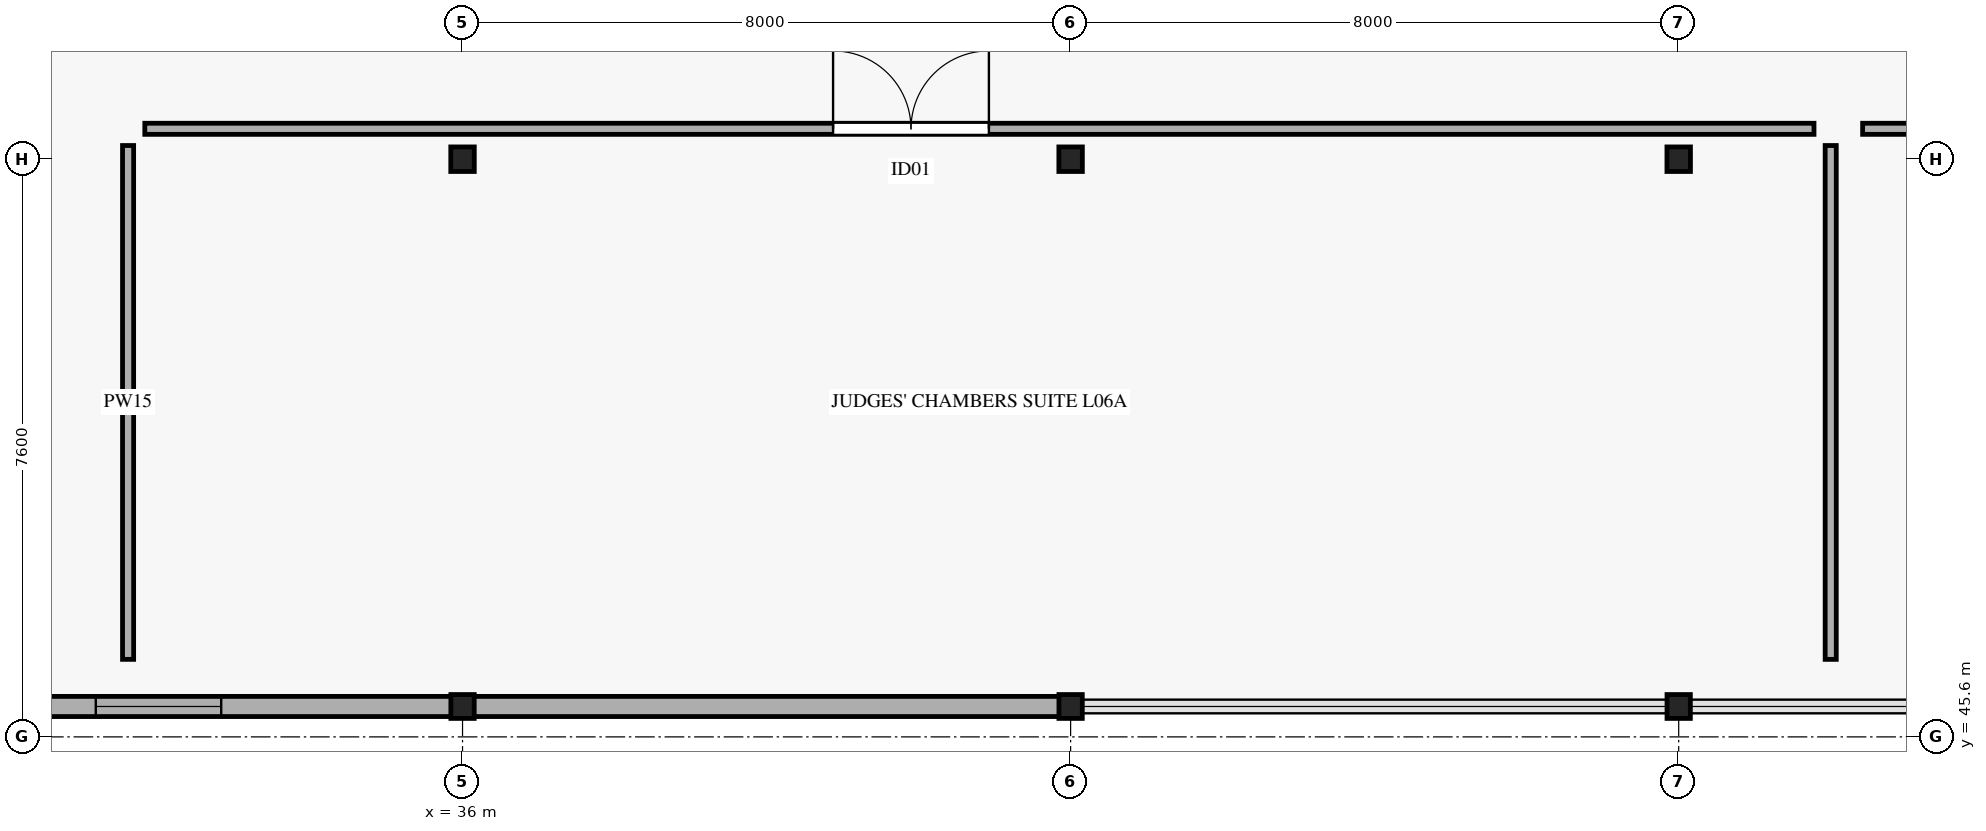
"""IFC4 building model, lengths in metres.
Left out: names, types, materials, properties, quantities, classifications, styles, units other than length and angle.
Written with IfcOpenShell. Run it as: python <this file> out.ifc"""

import sys

from ifc_helpers import new_model, si_unit, direction, frame, frame_2d, origin, origin_2d, place, context, subcontext, project, spatial, rectangle, i_section, extrude, element, fill, save


model = new_model("IFC4")
c1 = context("Model", 3, precision=1e-05, world=origin(), true_north=direction((0.0, 1.0)))
c2 = subcontext(c1, "Body", "Model", "MODEL_VIEW")
j1 = project(units=[si_unit("LENGTHUNIT", "METRE"), si_unit("PLANEANGLEUNIT", "RADIAN")], contexts=[c1])
p1 = place(None, origin())
s1 = spatial("IfcSite", under=j1, at=p1, CompositionType="ELEMENT")
p2 = place(p1, origin())
s2 = spatial("IfcBuilding", under=s1, at=p2, CompositionType="ELEMENT")
p3 = place(p2, frame((0.0, 0.0, 29.4)))
s3 = spatial("IfcBuildingStorey", under=s2, at=p3, CompositionType="ELEMENT", Elevation=29.4)
p4 = place(p3, frame((36.0, 46.0, 0.0), z_axis=(0.0, 0.0, 1.0), x_axis=(1.0, 0.0, 0.0)))
e1 = element("IfcColumn", 1, at=p4, inside=s3, PredefinedType="COLUMN", context=c2, shape_type="SweptSolid", body=[
    extrude(i_section(OverallWidth=0.307, OverallDepth=0.314, WebThickness=0.012, FlangeThickness=0.019, FilletRadius=0.015, at=origin_2d()), origin(), (0.0, 0.0, 1.0), 4.0),
])
p5 = place(p3, frame((36.0, 53.2, 0.0), z_axis=(0.0, 0.0, 1.0), x_axis=(1.0, 0.0, 0.0)))
e2 = element("IfcColumn", 2, at=p5, inside=s3, PredefinedType="COLUMN", context=c2, shape_type="SweptSolid", body=[
    extrude(i_section(OverallWidth=0.309, OverallDepth=0.323, WebThickness=0.014, FlangeThickness=0.023, FilletRadius=0.015, at=origin_2d()), origin(), (0.0, 0.0, 1.0), 4.0),
])
p6 = place(p3, frame((44.0, 46.0, 0.0), z_axis=(0.0, 0.0, 1.0), x_axis=(1.0, 0.0, 0.0)))
e3 = element("IfcColumn", 3, at=p6, inside=s3, PredefinedType="COLUMN", context=c2, shape_type="SweptSolid", body=[
    extrude(i_section(OverallWidth=0.307, OverallDepth=0.314, WebThickness=0.012, FlangeThickness=0.019, FilletRadius=0.015, at=origin_2d()), origin(), (0.0, 0.0, 1.0), 4.0),
])
p7 = place(p3, frame((44.0, 53.2, 0.0), z_axis=(0.0, 0.0, 1.0), x_axis=(1.0, 0.0, 0.0)))
e4 = element("IfcColumn", 4, at=p7, inside=s3, PredefinedType="COLUMN", context=c2, shape_type="SweptSolid", body=[
    extrude(i_section(OverallWidth=0.309, OverallDepth=0.323, WebThickness=0.014, FlangeThickness=0.023, FilletRadius=0.015, at=origin_2d()), origin(), (0.0, 0.0, 1.0), 4.0),
])
p8 = place(p3, frame((52.0, 46.0, 0.0), z_axis=(0.0, 0.0, 1.0), x_axis=(1.0, 0.0, 0.0)))
e5 = element("IfcColumn", 5, at=p8, inside=s3, PredefinedType="COLUMN", context=c2, shape_type="SweptSolid", body=[
    extrude(i_section(OverallWidth=0.307, OverallDepth=0.314, WebThickness=0.012, FlangeThickness=0.019, FilletRadius=0.015, at=origin_2d()), origin(), (0.0, 0.0, 1.0), 4.0),
])
p9 = place(p3, frame((52.0, 53.2, 0.0), z_axis=(0.0, 0.0, 1.0), x_axis=(1.0, 0.0, 0.0)))
e6 = element("IfcColumn", 6, at=p9, inside=s3, PredefinedType="COLUMN", context=c2, shape_type="SweptSolid", body=[
    extrude(i_section(OverallWidth=0.309, OverallDepth=0.323, WebThickness=0.014, FlangeThickness=0.023, FilletRadius=0.015, at=origin_2d()), origin(), (0.0, 0.0, 1.0), 4.0),
])
p10 = place(p3, frame((44.02, 46.0, 0.0), z_axis=(0.0, 0.0, 1.0), x_axis=(-1.0, 0.0, 0.0)))
e7 = element("IfcWall", 7, at=p10, inside=s3, PredefinedType="STANDARD", context=c2, shape_type="SweptSolid", body=[
    extrude(rectangle(XDim=8.04, YDim=0.265, at=frame_2d((4.02, 0.0))), origin(), (0.0, 0.0, 1.0), 3.06),
])
p11 = place(p3, frame((36.02, 46.0, 0.0), z_axis=(0.0, 0.0, 1.0), x_axis=(-1.0, 0.0, 0.0)))
e8 = element("IfcWall", 8, at=p11, inside=s3, PredefinedType="STANDARD", context=c2, shape_type="SweptSolid", body=[
    extrude(rectangle(XDim=8.04, YDim=0.265, at=frame_2d((4.02, 0.0))), origin(), (0.0, 0.0, 1.0), 3.06),
])
p12 = place(p11, frame((3.195, 0.0, 0.75)))
e9 = element("IfcOpeningElement", 9, at=p12, cuts=e8, PredefinedType="OPENING", context=c2, shape_type="SweptSolid", body=[
    extrude(rectangle(XDim=1.65, YDim=1.55, at=frame_2d((0.825, 0.775))), frame((0.0, 0.142, 0.0), z_axis=(0.0, -1.0, 0.0), x_axis=(1.0, 0.0, 0.0)), (0.0, 0.0, 1.0), 0.285),
])
p13 = place(p3, frame((31.82, 53.6, 0.0), z_axis=(0.0, 0.0, 1.0), x_axis=(1.0, 0.0, 0.0)))
e10 = element("IfcWall", 10, at=p13, inside=s3, PredefinedType="PARTITIONING", context=c2, shape_type="SweptSolid", body=[
    extrude(rectangle(XDim=21.96, YDim=0.146, at=frame_2d((10.98, 0.0))), origin(), (0.0, 0.0, 1.0), 2.85),
])
p14 = place(p13, frame((9.055, 0.0, 0.0)))
e11 = element("IfcOpeningElement", 11, at=p14, cuts=e10, PredefinedType="OPENING", context=c2, shape_type="SweptSolid", body=[
    extrude(rectangle(XDim=2.05, YDim=2.45, at=frame_2d((1.025, 1.225))), frame((0.0, 0.083, 0.0), z_axis=(0.0, -1.0, 0.0), x_axis=(1.0, 0.0, 0.0)), (0.0, 0.0, 1.0), 0.166),
])
for number, where, z_axis, x_axis in (
    (12, (31.6, 46.62, 0.0), (0.0, 0.0, 1.0), (0.0, 1.0, 0.0)),
    (13, (54.0, 46.62, 0.0), (0.0, 0.0, 1.0), (0.0, 1.0, 0.0)),
):
    element("IfcWall", number, at=place(p3, frame(where, z_axis=z_axis, x_axis=x_axis)), inside=s3, PredefinedType="PARTITIONING", context=c2, shape_type="SweptSolid", body=[
        extrude(rectangle(XDim=6.76, YDim=0.146, at=frame_2d((3.38, 0.0))), origin(), (0.0, 0.0, 1.0), 2.85),
    ])
p15 = place(p3, frame((54.42, 53.6, 0.0), z_axis=(0.0, 0.0, 1.0), x_axis=(1.0, 0.0, 0.0)))
e14 = element("IfcWall", 14, at=p15, inside=s3, PredefinedType="PARTITIONING", context=c2, shape_type="SweptSolid", body=[
    extrude(rectangle(XDim=44.96, YDim=0.146, at=frame_2d((22.48, 0.0))), origin(), (0.0, 0.0, 1.0), 2.85),
])
p16 = place(p15, frame((22.43, 0.0, 0.0)))
e15 = element("IfcOpeningElement", 15, at=p16, cuts=e14, PredefinedType="OPENING", context=c2, shape_type="SweptSolid", body=[
    extrude(rectangle(XDim=1.9, YDim=2.4, at=frame_2d((0.95, 1.2))), frame((0.0, 0.083, 0.0), z_axis=(0.0, -1.0, 0.0), x_axis=(1.0, 0.0, 0.0)), (0.0, 0.0, 1.0), 0.166),
])
p17 = place(p12, origin())
e16 = element("IfcWindow", 16, at=p17, inside=s3, PartitioningType="SINGLE_PANEL", PredefinedType="WINDOW", context=c2, shape_type="SweptSolid", body=[
    extrude(rectangle(XDim=1.65, YDim=1.55, at=frame_2d((0.825, 0.775))), frame((0.0, 0.03, 0.0), z_axis=(0.0, -1.0, 0.0), x_axis=(1.0, 0.0, 0.0)), (0.0, 0.0, 1.0), 0.06),
])
fill(e9, e16)
p18 = place(p14, origin())
e17 = element("IfcDoor", 17, at=p18, inside=s3, OperationType="DOUBLE_DOOR_SINGLE_SWING", PredefinedType="DOOR", context=c2, shape_type="SweptSolid", body=[
    extrude(rectangle(XDim=2.05, YDim=2.45, at=frame_2d((1.025, 1.225))), frame((0.0, 0.025, 0.0), z_axis=(0.0, -1.0, 0.0), x_axis=(1.0, 0.0, 0.0)), (0.0, 0.0, 1.0), 0.05),
])
fill(e11, e17)
save(model, sys.argv[1])
